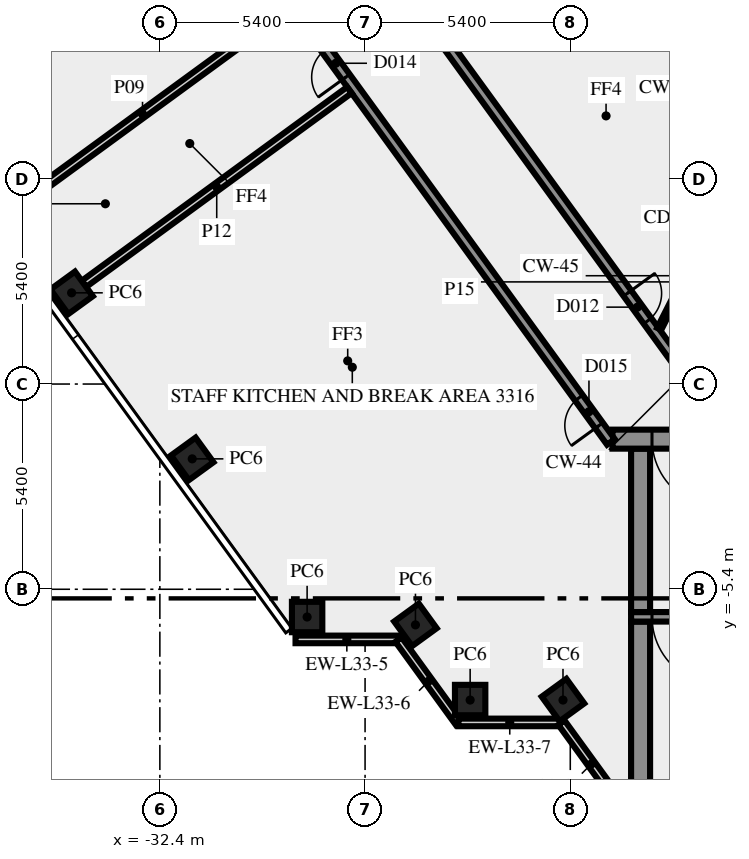
"""IFC4 building model, lengths in metres.
Left out: names, types, materials, properties, quantities, classifications, styles, units other than length and angle.
Written with IfcOpenShell. Run it as: python <this file> out.ifc"""

import sys

from ifc_helpers import new_model, si_unit, direction, frame, frame_2d, origin, origin_2d, place, context, subcontext, project, spatial, rectangle, extrude, element, fill, save


model = new_model("IFC4")
c1 = context("Model", 3, precision=1e-05, world=origin(), true_north=direction((0.0, 1.0)))
c2 = subcontext(c1, "Body", "Model", "MODEL_VIEW")
j1 = project(units=[si_unit("LENGTHUNIT", "METRE"), si_unit("PLANEANGLEUNIT", "RADIAN")], contexts=[c1])
p1 = place(None, origin())
s1 = spatial("IfcSite", under=j1, at=p1, CompositionType="ELEMENT")
p2 = place(p1, origin())
s2 = spatial("IfcBuilding", under=s1, at=p2, CompositionType="ELEMENT")
p3 = place(p2, frame((0.0, 0.0, 144.0)))
s3 = spatial("IfcBuildingStorey", under=s2, at=p3, CompositionType="ELEMENT", Elevation=144.0)
for number, where, z_axis, x_axis in (
    (1, (-34.722, 2.4, 0.0), (0.0, 0.0, 1.0), (0.588, -0.809, 0.0)),
    (2, (-31.548, -1.969, 0.0), (0.0, 0.0, 1.0), (0.588, -0.809, 0.0)),
    (3, (-28.525, -6.13, 0.0), (0.0, 0.0, 1.0), (1.0, 0.0, 0.0)),
    (4, (-25.674, -6.337, 0.0), (0.0, 0.0, 1.0), (0.588, -0.809, 0.0)),
    (5, (-24.235, -8.315, 0.0), (0.0, 0.0, 1.0), (1.0, 0.0, 0.0)),
    (6, (-21.792, -8.315, 0.0), (0.0, 0.0, 1.0), (0.588, -0.809, 0.0)),
):
    element("IfcColumn", number, at=place(p3, frame(where, z_axis=z_axis, x_axis=x_axis)), inside=s3, PredefinedType="COLUMN", context=c2, shape_type="SweptSolid", body=[
        extrude(rectangle(XDim=0.8, YDim=0.8, at=origin_2d()), origin(), (0.0, 0.0, 1.0), 3.65),
    ])
p4 = place(p3, frame((-28.83, -6.719, 0.0), z_axis=(0.0, 0.0, 1.0), x_axis=(1.0, 0.0, 0.0)))
e7 = element("IfcWall", 7, at=p4, inside=s3, PredefinedType="SOLIDWALL", context=c2, shape_type="SweptSolid", body=[
    extrude(rectangle(XDim=2.7, YDim=0.2, at=frame_2d((1.35, 0.0))), origin(), (0.0, 0.0, 1.0), 3.65),
])
p5 = place(p3, frame((-26.12, -6.724, 0.0), z_axis=(0.0, 0.0, 1.0), x_axis=(0.587720002413, -0.809064397168, 0.0)))
e8 = element("IfcWall", 8, at=p5, inside=s3, PredefinedType="SOLIDWALL", context=c2, shape_type="SweptSolid", body=[
    extrude(rectangle(XDim=2.7, YDim=0.2, at=frame_2d((1.35, 0.0))), origin(), (0.0, 0.0, 1.0), 3.65),
])
p6 = place(p3, frame((-24.543, -8.904, 0.0), z_axis=(0.0, 0.0, 1.0), x_axis=(1.0, 0.0, 0.0)))
e9 = element("IfcWall", 9, at=p6, inside=s3, PredefinedType="SOLIDWALL", context=c2, shape_type="SweptSolid", body=[
    extrude(rectangle(XDim=2.7, YDim=0.2, at=frame_2d((1.35, 0.0))), origin(), (0.0, 0.0, 1.0), 3.65),
])
p7 = place(p3, frame((-21.833, -8.909, 0.0), z_axis=(0.0, 0.0, 1.0), x_axis=(0.587766567315, -0.809030569476, 0.0)))
e10 = element("IfcWall", 10, at=p7, inside=s3, PredefinedType="SOLIDWALL", context=c2, shape_type="SweptSolid", body=[
    extrude(rectangle(XDim=2.688, YDim=0.2, at=frame_2d((1.344, 0.0))), origin(), (0.0, 0.0, 1.0), 3.65),
])
p8 = place(p3, frame((-19.75, -10.5, 0.0), z_axis=(0.0, 0.0, 1.0), x_axis=(0.0, 1.0, 0.0)))
e11 = element("IfcWall", 11, at=p8, inside=s3, PredefinedType="SHEAR", context=c2, shape_type="SweptSolid", body=[
    extrude(rectangle(XDim=4.25, YDim=0.5, at=frame_2d((2.125, 0.0))), origin(), (0.0, 0.0, 1.0), 3.65),
])
p9 = place(p3, frame((-9.8, -6.125, 0.0), z_axis=(0.0, 0.0, 1.0), x_axis=(-1.0, 0.0, 0.0)))
e12 = element("IfcWall", 12, at=p9, inside=s3, PredefinedType="SHEAR", context=c2, shape_type="SweptSolid", body=[
    extrude(rectangle(XDim=10.2, YDim=0.25, at=frame_2d((5.1, 0.0))), origin(), (0.0, 0.0, 1.0), 3.65),
])
p10 = place(p9, frame((7.85, 0.0, 0.0)))
e13 = element("IfcOpeningElement", 13, at=p10, cuts=e12, PredefinedType="OPENING", context=c2, shape_type="SweptSolid", body=[
    extrude(rectangle(XDim=1.8, YDim=2.1, at=frame_2d((0.9, 1.05))), frame((0.0, 0.135, 0.0), z_axis=(0.0, -1.0, 0.0), x_axis=(1.0, 0.0, 0.0)), (0.0, 0.0, 1.0), 0.27),
])
p11 = place(p3, frame((-19.75, -6.0, 0.0), z_axis=(0.0, 0.0, 1.0), x_axis=(0.0, 1.0, 0.0)))
e14 = element("IfcWall", 14, at=p11, inside=s3, PredefinedType="SHEAR", context=c2, shape_type="SweptSolid", body=[
    extrude(rectangle(XDim=4.3, YDim=0.5, at=frame_2d((2.15, 0.0))), origin(), (0.0, 0.0, 1.0), 3.65),
])
p12 = place(p3, frame((20.49, -1.45, 0.0), z_axis=(0.0, 0.0, 1.0), x_axis=(-1.0, 0.0, 0.0)))
e15 = element("IfcWall", 15, at=p12, inside=s3, PredefinedType="SHEAR", context=c2, shape_type="SweptSolid", body=[
    extrude(rectangle(XDim=40.98, YDim=0.5, at=frame_2d((20.49, 0.0))), origin(), (0.0, 0.0, 1.0), 3.65),
])
p13 = place(p12, frame((38.14, 0.0, 0.0)))
e16 = element("IfcOpeningElement", 16, at=p13, cuts=e15, PredefinedType="OPENING", context=c2, shape_type="SweptSolid", body=[
    extrude(rectangle(XDim=1.8, YDim=2.1, at=frame_2d((0.9, 1.05))), frame((0.0, 0.26, 0.0), z_axis=(0.0, -1.0, 0.0), x_axis=(1.0, 0.0, 0.0)), (0.0, 0.0, 1.0), 0.52),
])
p14 = place(p12, frame((35.89, 0.0, 0.0)))
e17 = element("IfcOpeningElement", 17, at=p14, cuts=e15, PredefinedType="OPENING", context=c2, shape_type="SweptSolid", body=[
    extrude(rectangle(XDim=0.9, YDim=2.1, at=frame_2d((0.45, 1.05))), frame((0.0, 0.26, 0.0), z_axis=(0.0, -1.0, 0.0), x_axis=(1.0, 0.0, 0.0)), (0.0, 0.0, 1.0), 0.52),
])
p15 = place(p12, frame((32.94, 0.0, 0.0)))
e18 = element("IfcOpeningElement", 18, at=p15, cuts=e15, PredefinedType="OPENING", context=c2, shape_type="SweptSolid", body=[
    extrude(rectangle(XDim=0.9, YDim=2.1, at=frame_2d((0.45, 1.05))), frame((0.0, 0.26, 0.0), z_axis=(0.0, -1.0, 0.0), x_axis=(1.0, 0.0, 0.0)), (0.0, 0.0, 1.0), 0.52),
])
p16 = place(p12, frame((29.802, 0.0, 0.0)))
e19 = element("IfcOpeningElement", 19, at=p16, cuts=e15, PredefinedType="OPENING", context=c2, shape_type="SweptSolid", body=[
    extrude(rectangle(XDim=0.9, YDim=2.1, at=frame_2d((0.45, 1.05))), frame((0.0, 0.26, 0.0), z_axis=(0.0, -1.0, 0.0), x_axis=(1.0, 0.0, 0.0)), (0.0, 0.0, 1.0), 0.52),
])
p17 = place(p12, frame((26.077, 0.0, 0.0)))
e20 = element("IfcOpeningElement", 20, at=p17, cuts=e15, PredefinedType="OPENING", context=c2, shape_type="SweptSolid", body=[
    extrude(rectangle(XDim=0.9, YDim=2.1, at=frame_2d((0.45, 1.05))), frame((0.0, 0.26, 0.0), z_axis=(0.0, -1.0, 0.0), x_axis=(1.0, 0.0, 0.0)), (0.0, 0.0, 1.0), 0.52),
])
p18 = place(p12, frame((19.59, 0.0, 0.0)))
e21 = element("IfcOpeningElement", 21, at=p18, cuts=e15, PredefinedType="OPENING", context=c2, shape_type="SweptSolid", body=[
    extrude(rectangle(XDim=2.0, YDim=2.1, at=frame_2d((1.0, 1.05))), frame((0.0, 0.26, 0.0), z_axis=(0.0, -1.0, 0.0), x_axis=(1.0, 0.0, 0.0)), (0.0, 0.0, 1.0), 0.52),
])
p19 = place(p12, frame((7.14, 0.0, 0.0)))
e22 = element("IfcOpeningElement", 22, at=p19, cuts=e15, PredefinedType="OPENING", context=c2, shape_type="SweptSolid", body=[
    extrude(rectangle(XDim=0.9, YDim=2.1, at=frame_2d((0.45, 1.05))), frame((0.0, 0.26, 0.0), z_axis=(0.0, -1.0, 0.0), x_axis=(1.0, 0.0, 0.0)), (0.0, 0.0, 1.0), 0.52),
])
p20 = place(p12, frame((5.028, 0.0, 0.0)))
e23 = element("IfcOpeningElement", 23, at=p20, cuts=e15, PredefinedType="OPENING", context=c2, shape_type="SweptSolid", body=[
    extrude(rectangle(XDim=0.8, YDim=2.1, at=frame_2d((0.4, 1.05))), frame((0.0, 0.26, 0.0), z_axis=(0.0, -1.0, 0.0), x_axis=(1.0, 0.0, 0.0)), (0.0, 0.0, 1.0), 0.52),
])
p21 = place(p12, frame((3.452, 0.0, 0.0)))
e24 = element("IfcOpeningElement", 24, at=p21, cuts=e15, PredefinedType="OPENING", context=c2, shape_type="SweptSolid", body=[
    extrude(rectangle(XDim=0.8, YDim=2.1, at=frame_2d((0.4, 1.05))), frame((0.0, 0.26, 0.0), z_axis=(0.0, -1.0, 0.0), x_axis=(1.0, 0.0, 0.0)), (0.0, 0.0, 1.0), 0.52),
])
p22 = place(p12, frame((1.04, 0.0, 0.0)))
e25 = element("IfcOpeningElement", 25, at=p22, cuts=e15, PredefinedType="OPENING", context=c2, shape_type="SweptSolid", body=[
    extrude(rectangle(XDim=1.8, YDim=2.1, at=frame_2d((0.9, 1.05))), frame((0.0, 0.26, 0.0), z_axis=(0.0, -1.0, 0.0), x_axis=(1.0, 0.0, 0.0)), (0.0, 0.0, 1.0), 0.52),
])
p23 = place(p3, frame((-20.531, -1.523, 0.0), z_axis=(0.0, 0.0, 1.0), x_axis=(-0.587785812891, 0.809016587076, 0.0)))
e26 = element("IfcWall", 26, at=p23, inside=s3, PredefinedType="SOLIDWALL", context=c2, shape_type="SweptSolid", body=[
    extrude(rectangle(XDim=28.67, YDim=0.25, at=frame_2d((14.335, 0.0))), origin(), (0.0, 0.0, 1.0), 3.65),
])
p24 = place(p23, frame((27.296, 0.0, 0.0)))
e27 = element("IfcOpeningElement", 27, at=p24, cuts=e26, PredefinedType="OPENING", context=c2, shape_type="SweptSolid", body=[
    extrude(rectangle(XDim=0.9, YDim=2.1, at=frame_2d((0.45, 1.05))), frame((0.0, 0.135, 0.0), z_axis=(0.0, -1.0, 0.0), x_axis=(1.0, 0.0, 0.0)), (0.0, 0.0, 1.0), 0.27),
])
p25 = place(p23, frame((11.866, 0.0, 0.0)))
e28 = element("IfcOpeningElement", 28, at=p25, cuts=e26, PredefinedType="OPENING", context=c2, shape_type="SweptSolid", body=[
    extrude(rectangle(XDim=0.9, YDim=2.1, at=frame_2d((0.45, 1.05))), frame((0.0, 0.135, 0.0), z_axis=(0.0, -1.0, 0.0), x_axis=(1.0, 0.0, 0.0)), (0.0, 0.0, 1.0), 0.27),
])
p26 = place(p23, frame((0.533, 0.0, 0.0)))
e29 = element("IfcOpeningElement", 29, at=p26, cuts=e26, PredefinedType="OPENING", context=c2, shape_type="SweptSolid", body=[
    extrude(rectangle(XDim=0.9, YDim=2.1, at=frame_2d((0.45, 1.05))), frame((0.0, 0.135, 0.0), z_axis=(0.0, -1.0, 0.0), x_axis=(1.0, 0.0, 0.0)), (0.0, 0.0, 1.0), 0.27),
])
p27 = place(p3, frame((-35.092, 23.027, 0.0), z_axis=(0.0, 0.0, 1.0), x_axis=(0.587784076945, -0.809017848313, 0.0)))
e30 = element("IfcWall", 30, at=p27, inside=s3, PredefinedType="SOLIDWALL", context=c2, shape_type="SweptSolid", body=[
    extrude(rectangle(XDim=29.853, YDim=0.25, at=frame_2d((14.927, 0.0))), origin(), (0.0, 0.0, 1.0), 3.65),
])
p28 = place(p27, frame((0.224, 0.0, 0.0)))
e31 = element("IfcOpeningElement", 31, at=p28, cuts=e30, PredefinedType="OPENING", context=c2, shape_type="SweptSolid", body=[
    extrude(rectangle(XDim=0.9, YDim=2.1, at=frame_2d((0.45, 1.05))), frame((0.0, 0.135, 0.0), z_axis=(0.0, -1.0, 0.0), x_axis=(1.0, 0.0, 0.0)), (0.0, 0.0, 1.0), 0.27),
])
p29 = place(p27, frame((25.512, 0.0, 0.0)))
e32 = element("IfcOpeningElement", 32, at=p29, cuts=e30, PredefinedType="OPENING", context=c2, shape_type="SweptSolid", body=[
    extrude(rectangle(XDim=0.9, YDim=2.1, at=frame_2d((0.45, 1.05))), frame((0.0, 0.135, 0.0), z_axis=(0.0, -1.0, 0.0), x_axis=(1.0, 0.0, 0.0)), (0.0, 0.0, 1.0), 0.27),
])
p30 = place(p3, frame((-36.712, 4.288, 0.0), z_axis=(0.0, 0.0, 1.0), x_axis=(0.807606997933, 0.589721067023, 0.0)))
e33 = element("IfcWall", 33, at=p30, inside=s3, PredefinedType="SOLIDWALL", context=c2, shape_type="SweptSolid", body=[
    extrude(rectangle(XDim=9.55, YDim=0.2, at=frame_2d((4.775, 0.0))), origin(), (0.0, 0.0, 1.0), 2.85),
])
p31 = place(p3, frame((-34.395, 2.638, 0.0), z_axis=(0.0, 0.0, 1.0), x_axis=(0.807657534767, 0.589651851973, 0.0)))
e34 = element("IfcWall", 34, at=p31, inside=s3, PredefinedType="SOLIDWALL", context=c2, shape_type="SweptSolid", body=[
    extrude(rectangle(XDim=8.644, YDim=0.2, at=frame_2d((4.322, 0.0))), origin(), (0.0, 0.0, 1.0), 3.65),
])
p32 = place(p3, frame((-19.261, 1.45, 0.0), z_axis=(0.0, 0.0, 1.0), x_axis=(0.453950796792, 0.891026752736, 0.0)))
e35 = element("IfcWall", 35, at=p32, inside=s3, PredefinedType="PARTITIONING", context=c2, shape_type="SweptSolid", body=[
    extrude(rectangle(XDim=2.778, YDim=0.12, at=frame_2d((1.389, 0.0))), origin(), (0.0, 0.0, 1.0), 3.65),
])
p33 = place(p10, origin())
e36 = element("IfcDoor", 36, at=p33, inside=s3, OperationType="DOUBLE_DOOR_SINGLE_SWING", PredefinedType="DOOR", context=c2, shape_type="SweptSolid", body=[
    extrude(rectangle(XDim=1.8, YDim=2.1, at=frame_2d((0.9, 1.05))), frame((0.0, 0.025, 0.0), z_axis=(0.0, -1.0, 0.0), x_axis=(1.0, 0.0, 0.0)), (0.0, 0.0, 1.0), 0.05),
])
fill(e13, e36)
p34 = place(p13, origin())
e37 = element("IfcDoor", 37, at=p34, inside=s3, OperationType="DOUBLE_DOOR_SINGLE_SWING", PredefinedType="DOOR", context=c2, shape_type="SweptSolid", body=[
    extrude(rectangle(XDim=1.8, YDim=2.1, at=frame_2d((0.9, 1.05))), frame((0.0, 0.025, 0.0), z_axis=(0.0, -1.0, 0.0), x_axis=(1.0, 0.0, 0.0)), (0.0, 0.0, 1.0), 0.05),
])
fill(e16, e37)
p35 = place(p29, origin())
e38 = element("IfcDoor", 38, at=p35, inside=s3, OperationType="SINGLE_SWING_RIGHT", PredefinedType="DOOR", context=c2, shape_type="SweptSolid", body=[
    extrude(rectangle(XDim=0.9, YDim=2.1, at=frame_2d((0.45, 1.05))), frame((0.0, 0.025, 0.0), z_axis=(0.0, -1.0, 0.0), x_axis=(1.0, 0.0, 0.0)), (0.0, 0.0, 1.0), 0.05),
])
fill(e32, e38)
p36 = place(p25, origin())
e39 = element("IfcDoor", 39, at=p36, inside=s3, OperationType="SINGLE_SWING_LEFT", PredefinedType="DOOR", context=c2, shape_type="SweptSolid", body=[
    extrude(rectangle(XDim=0.9, YDim=2.1, at=frame_2d((0.45, 1.05))), frame((0.0, 0.025, 0.0), z_axis=(0.0, -1.0, 0.0), x_axis=(1.0, 0.0, 0.0)), (0.0, 0.0, 1.0), 0.05),
])
fill(e28, e39)
p37 = place(p26, origin())
e40 = element("IfcDoor", 40, at=p37, inside=s3, OperationType="SINGLE_SWING_LEFT", PredefinedType="DOOR", context=c2, shape_type="SweptSolid", body=[
    extrude(rectangle(XDim=0.9, YDim=2.1, at=frame_2d((0.45, 1.05))), frame((0.0, 0.025, 0.0), z_axis=(0.0, -1.0, 0.0), x_axis=(1.0, 0.0, 0.0)), (0.0, 0.0, 1.0), 0.05),
])
fill(e29, e40)
save(model, sys.argv[1])
